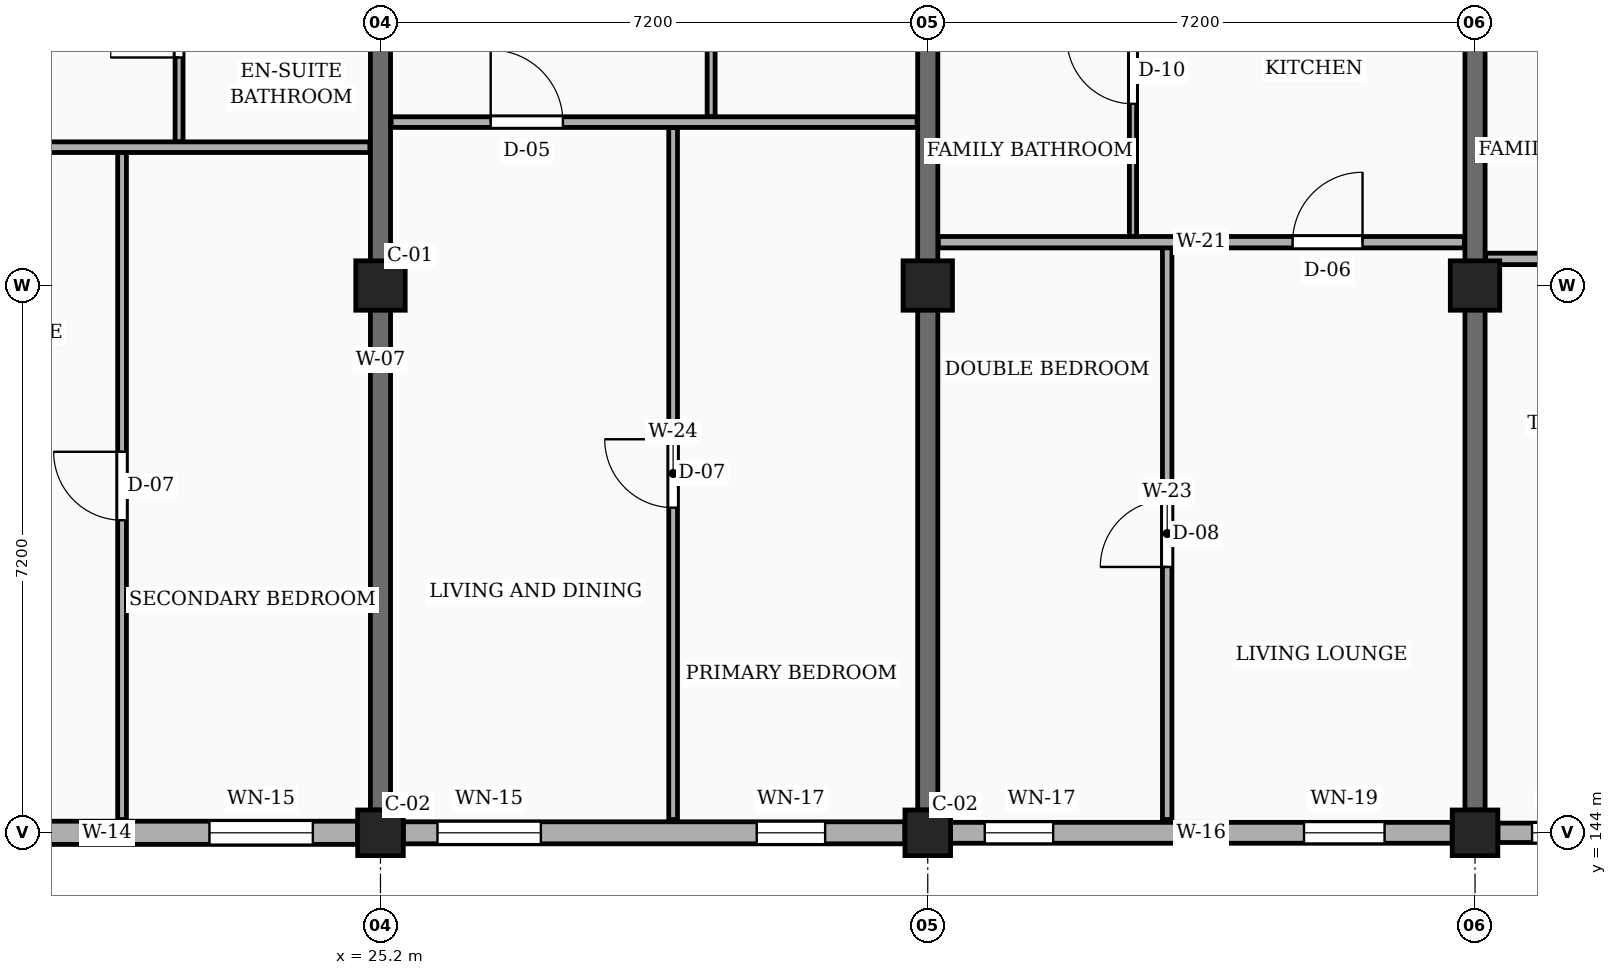
"""IFC4 building model, lengths in metres.
Left out: names, types, materials, properties, quantities, classifications, styles, units other than length and angle.
Written with IfcOpenShell. Run it as: python <this file> out.ifc"""

import sys

from ifc_helpers import new_model, si_unit, direction, frame, frame_2d, origin, origin_2d, place, context, subcontext, project, spatial, rectangle, extrude, element, fill, save


model = new_model("IFC4")
c1 = context("Model", 3, precision=1e-05, world=origin(), true_north=direction((0.0, 1.0)))
c2 = subcontext(c1, "Body", "Model", "MODEL_VIEW")
j1 = project(units=[si_unit("LENGTHUNIT", "METRE"), si_unit("PLANEANGLEUNIT", "RADIAN")], contexts=[c1])
p1 = place(None, origin())
s1 = spatial("IfcSite", under=j1, at=p1, CompositionType="ELEMENT")
p2 = place(p1, origin())
s2 = spatial("IfcBuilding", under=s1, at=p2, CompositionType="ELEMENT")
p3 = place(p2, frame((0.0, 0.0, 4.5)))
s3 = spatial("IfcBuildingStorey", under=s2, at=p3, CompositionType="ELEMENT", Elevation=4.5)
p4 = place(p3, frame((25.2, 144.0, 0.0), z_axis=(0.0, 0.0, 1.0), x_axis=(1.0, 0.0, 0.0)))
e1 = element("IfcColumn", 1, at=p4, inside=s3, PredefinedType="COLUMN", context=c2, shape_type="SweptSolid", body=[
    extrude(rectangle(XDim=0.6, YDim=0.6, at=origin_2d()), origin(), (0.0, 0.0, 1.0), 3.15),
])
p5 = place(p3, frame((25.2, 151.2, 0.0), z_axis=(0.0, 0.0, 1.0), x_axis=(1.0, 0.0, 0.0)))
e2 = element("IfcColumn", 2, at=p5, inside=s3, PredefinedType="COLUMN", context=c2, shape_type="SweptSolid", body=[
    extrude(rectangle(XDim=0.65, YDim=0.65, at=origin_2d()), origin(), (0.0, 0.0, 1.0), 3.15),
])
p6 = place(p3, frame((32.4, 144.0, 0.0), z_axis=(0.0, 0.0, 1.0), x_axis=(1.0, 0.0, 0.0)))
e3 = element("IfcColumn", 3, at=p6, inside=s3, PredefinedType="COLUMN", context=c2, shape_type="SweptSolid", body=[
    extrude(rectangle(XDim=0.6, YDim=0.6, at=origin_2d()), origin(), (0.0, 0.0, 1.0), 3.15),
])
p7 = place(p3, frame((32.4, 151.2, 0.0), z_axis=(0.0, 0.0, 1.0), x_axis=(1.0, 0.0, 0.0)))
e4 = element("IfcColumn", 4, at=p7, inside=s3, PredefinedType="COLUMN", context=c2, shape_type="SweptSolid", body=[
    extrude(rectangle(XDim=0.65, YDim=0.65, at=origin_2d()), origin(), (0.0, 0.0, 1.0), 3.15),
])
p8 = place(p3, frame((39.6, 144.0, 0.0), z_axis=(0.0, 0.0, 1.0), x_axis=(1.0, 0.0, 0.0)))
e5 = element("IfcColumn", 5, at=p8, inside=s3, PredefinedType="COLUMN", context=c2, shape_type="SweptSolid", body=[
    extrude(rectangle(XDim=0.6, YDim=0.6, at=origin_2d()), origin(), (0.0, 0.0, 1.0), 3.15),
])
p9 = place(p3, frame((39.6, 151.2, 0.0), z_axis=(0.0, 0.0, 1.0), x_axis=(1.0, 0.0, 0.0)))
e6 = element("IfcColumn", 6, at=p9, inside=s3, PredefinedType="COLUMN", context=c2, shape_type="SweptSolid", body=[
    extrude(rectangle(XDim=0.65, YDim=0.65, at=origin_2d()), origin(), (0.0, 0.0, 1.0), 3.15),
])
for number, where, z_axis, x_axis in (
    (7, (25.2, 144.3, 0.0), (0.0, 0.0, 1.0), (0.0, 1.0, 0.0)),
    (8, (32.4, 144.3, 0.0), (0.0, 0.0, 1.0), (0.0, 1.0, 0.0)),
    (9, (39.6, 144.3, 0.0), (0.0, 0.0, 1.0), (0.0, 1.0, 0.0)),
):
    element("IfcWall", number, at=place(p3, frame(where, z_axis=z_axis, x_axis=x_axis)), inside=s3, PredefinedType="SOLIDWALL", context=c2, shape_type="SweptSolid", body=[
        extrude(rectangle(XDim=11.85, YDim=0.265, at=frame_2d((5.925, 0.0))), origin(), (0.0, 0.0, 1.0), 2.185),
    ])
p10 = place(p3, frame((18.3, 144.0, 0.0), z_axis=(0.0, 0.0, 1.0), x_axis=(1.0, 0.0, 0.0)))
e10 = element("IfcWall", 10, at=p10, inside=s3, PredefinedType="SOLIDWALL", context=c2, shape_type="SweptSolid", body=[
    extrude(rectangle(XDim=6.6, YDim=0.305, at=frame_2d((3.3, 0.0))), origin(), (0.0, 0.0, 1.0), 2.455),
])
p11 = place(p10, frame((0.45, 0.0, 0.78)))
e11 = element("IfcOpeningElement", 11, at=p11, cuts=e10, PredefinedType="OPENING", context=c2, shape_type="SweptSolid", body=[
    extrude(rectangle(XDim=1.2, YDim=1.26, at=frame_2d((0.6, 0.63))), frame((0.0, 0.163, 0.0), z_axis=(0.0, -1.0, 0.0), x_axis=(1.0, 0.0, 0.0)), (0.0, 0.0, 1.0), 0.325),
])
p12 = place(p10, frame((4.65, 0.0, 0.78)))
e12 = element("IfcOpeningElement", 12, at=p12, cuts=e10, PredefinedType="OPENING", context=c2, shape_type="SweptSolid", body=[
    extrude(rectangle(XDim=1.36, YDim=1.26, at=frame_2d((0.68, 0.63))), frame((0.0, 0.163, 0.0), z_axis=(0.0, -1.0, 0.0), x_axis=(1.0, 0.0, 0.0)), (0.0, 0.0, 1.0), 0.325),
])
p13 = place(p3, frame((25.5, 144.0, 0.0), z_axis=(0.0, 0.0, 1.0), x_axis=(1.0, 0.0, 0.0)))
e13 = element("IfcWall", 13, at=p13, inside=s3, PredefinedType="SOLIDWALL", context=c2, shape_type="SweptSolid", body=[
    extrude(rectangle(XDim=6.6, YDim=0.29, at=frame_2d((3.3, 0.0))), origin(), (0.0, 0.0, 1.0), 2.455),
])
p14 = place(p13, frame((0.45, 0.0, 0.78)))
e14 = element("IfcOpeningElement", 14, at=p14, cuts=e13, PredefinedType="OPENING", context=c2, shape_type="SweptSolid", body=[
    extrude(rectangle(XDim=1.36, YDim=1.26, at=frame_2d((0.68, 0.63))), frame((0.0, 0.155, 0.0), z_axis=(0.0, -1.0, 0.0), x_axis=(1.0, 0.0, 0.0)), (0.0, 0.0, 1.0), 0.31),
])
p15 = place(p13, frame((4.65, 0.0, 0.78)))
e15 = element("IfcOpeningElement", 15, at=p15, cuts=e13, PredefinedType="OPENING", context=c2, shape_type="SweptSolid", body=[
    extrude(rectangle(XDim=0.9, YDim=1.36, at=frame_2d((0.45, 0.68))), frame((0.0, 0.155, 0.0), z_axis=(0.0, -1.0, 0.0), x_axis=(1.0, 0.0, 0.0)), (0.0, 0.0, 1.0), 0.31),
])
p16 = place(p3, frame((32.7, 144.0, 0.0), z_axis=(0.0, 0.0, 1.0), x_axis=(1.0, 0.0, 0.0)))
e16 = element("IfcWall", 16, at=p16, inside=s3, PredefinedType="SOLIDWALL", context=c2, shape_type="SweptSolid", body=[
    extrude(rectangle(XDim=6.6, YDim=0.275, at=frame_2d((3.3, 0.0))), origin(), (0.0, 0.0, 1.0), 2.455),
])
p17 = place(p16, frame((0.45, 0.0, 0.78)))
e17 = element("IfcOpeningElement", 17, at=p17, cuts=e16, PredefinedType="OPENING", context=c2, shape_type="SweptSolid", body=[
    extrude(rectangle(XDim=0.9, YDim=1.36, at=frame_2d((0.45, 0.68))), frame((0.0, 0.147, 0.0), z_axis=(0.0, -1.0, 0.0), x_axis=(1.0, 0.0, 0.0)), (0.0, 0.0, 1.0), 0.295),
])
p18 = place(p16, frame((4.65, 0.0, 0.78)))
e18 = element("IfcOpeningElement", 18, at=p18, cuts=e16, PredefinedType="OPENING", context=c2, shape_type="SweptSolid", body=[
    extrude(rectangle(XDim=1.06, YDim=1.36, at=frame_2d((0.53, 0.68))), frame((0.0, 0.147, 0.0), z_axis=(0.0, -1.0, 0.0), x_axis=(1.0, 0.0, 0.0)), (0.0, 0.0, 1.0), 0.295),
])
p19 = place(p3, frame((39.9, 144.0, 0.0), z_axis=(0.0, 0.0, 1.0), x_axis=(1.0, 0.0, 0.0)))
e19 = element("IfcWall", 19, at=p19, inside=s3, PredefinedType="SOLIDWALL", context=c2, shape_type="SweptSolid", body=[
    extrude(rectangle(XDim=6.6, YDim=0.255, at=frame_2d((3.3, 0.0))), origin(), (0.0, 0.0, 1.0), 2.455),
])
p20 = place(p19, frame((0.45, 0.0, 0.78)))
e20 = element("IfcOpeningElement", 20, at=p20, cuts=e19, PredefinedType="OPENING", context=c2, shape_type="SweptSolid", body=[
    extrude(rectangle(XDim=1.06, YDim=1.36, at=frame_2d((0.53, 0.68))), frame((0.0, 0.137, 0.0), z_axis=(0.0, -1.0, 0.0), x_axis=(1.0, 0.0, 0.0)), (0.0, 0.0, 1.0), 0.275),
])
p21 = place(p19, frame((4.65, 0.0, 0.78)))
e21 = element("IfcOpeningElement", 21, at=p21, cuts=e19, PredefinedType="OPENING", context=c2, shape_type="SweptSolid", body=[
    extrude(rectangle(XDim=1.22, YDim=1.36, at=frame_2d((0.61, 0.68))), frame((0.0, 0.137, 0.0), z_axis=(0.0, -1.0, 0.0), x_axis=(1.0, 0.0, 0.0)), (0.0, 0.0, 1.0), 0.275),
])
p22 = place(p3, frame((21.8, 144.175, 0.0), z_axis=(0.0, 0.0, 1.0), x_axis=(0.0, 1.0, 0.0)))
e22 = element("IfcWall", 22, at=p22, inside=s3, PredefinedType="PARTITIONING", context=c2, shape_type="SweptSolid", body=[
    extrude(rectangle(XDim=8.775, YDim=0.115, at=frame_2d((4.387, 0.0))), origin(), (0.0, 0.0, 1.0), 2.32),
])
p23 = place(p22, frame((3.938, 0.0, 0.0)))
e23 = element("IfcOpeningElement", 23, at=p23, cuts=e22, PredefinedType="OPENING", context=c2, shape_type="SweptSolid", body=[
    extrude(rectangle(XDim=0.9, YDim=2.1, at=frame_2d((0.45, 1.05))), frame((0.0, 0.067, 0.0), z_axis=(0.0, -1.0, 0.0), x_axis=(1.0, 0.0, 0.0)), (0.0, 0.0, 1.0), 0.135),
])
p24 = place(p3, frame((22.55, 153.09, 0.0), z_axis=(0.0, 0.0, 1.0), x_axis=(0.0, 1.0, 0.0)))
e24 = element("IfcWall", 24, at=p24, inside=s3, PredefinedType="PARTITIONING", context=c2, shape_type="SweptSolid", body=[
    extrude(rectangle(XDim=3.12, YDim=0.105, at=frame_2d((1.56, 0.0))), origin(), (0.0, 0.0, 1.0), 2.32),
])
p25 = place(p24, frame((1.11, 0.0, 0.0)))
e25 = element("IfcOpeningElement", 25, at=p25, cuts=e24, PredefinedType="OPENING", context=c2, shape_type="SweptSolid", body=[
    extrude(rectangle(XDim=0.9, YDim=2.05, at=frame_2d((0.45, 1.025))), frame((0.0, 0.062, 0.0), z_axis=(0.0, -1.0, 0.0), x_axis=(1.0, 0.0, 0.0)), (0.0, 0.0, 1.0), 0.125),
])
p26 = place(p3, frame((18.14, 153.02, 0.0), z_axis=(0.0, 0.0, 1.0), x_axis=(1.0, 0.0, 0.0)))
e26 = element("IfcWall", 26, at=p26, inside=s3, PredefinedType="PARTITIONING", context=c2, shape_type="SweptSolid", body=[
    extrude(rectangle(XDim=6.92, YDim=0.14, at=frame_2d((3.46, 0.0))), origin(), (0.0, 0.0, 1.0), 2.32),
])
p27 = place(p26, frame((1.31, 0.0, 0.0)))
e27 = element("IfcOpeningElement", 27, at=p27, cuts=e26, PredefinedType="OPENING", context=c2, shape_type="SweptSolid", body=[
    extrude(rectangle(XDim=0.95, YDim=2.1, at=frame_2d((0.475, 1.05))), frame((0.0, 0.08, 0.0), z_axis=(0.0, -1.0, 0.0), x_axis=(1.0, 0.0, 0.0)), (0.0, 0.0, 1.0), 0.16),
])
p28 = place(p3, frame((29.05, 144.175, 0.0), z_axis=(0.0, 0.0, 1.0), x_axis=(0.0, 1.0, 0.0)))
e28 = element("IfcWall", 28, at=p28, inside=s3, PredefinedType="PARTITIONING", context=c2, shape_type="SweptSolid", body=[
    extrude(rectangle(XDim=9.105, YDim=0.115, at=frame_2d((4.552, 0.0))), origin(), (0.0, 0.0, 1.0), 2.32),
])
p29 = place(p28, frame((4.103, 0.0, 0.0)))
e29 = element("IfcOpeningElement", 29, at=p29, cuts=e28, PredefinedType="OPENING", context=c2, shape_type="SweptSolid", body=[
    extrude(rectangle(XDim=0.9, YDim=2.1, at=frame_2d((0.45, 1.05))), frame((0.0, 0.067, 0.0), z_axis=(0.0, -1.0, 0.0), x_axis=(1.0, 0.0, 0.0)), (0.0, 0.0, 1.0), 0.135),
])
p30 = place(p3, frame((29.55, 153.42, 0.0), z_axis=(0.0, 0.0, 1.0), x_axis=(0.0, 1.0, 0.0)))
e30 = element("IfcWall", 30, at=p30, inside=s3, PredefinedType="PARTITIONING", context=c2, shape_type="SweptSolid", body=[
    extrude(rectangle(XDim=2.79, YDim=0.105, at=frame_2d((1.395, 0.0))), origin(), (0.0, 0.0, 1.0), 2.32),
])
p31 = place(p30, frame((0.945, 0.0, 0.0)))
e31 = element("IfcOpeningElement", 31, at=p31, cuts=e30, PredefinedType="OPENING", context=c2, shape_type="SweptSolid", body=[
    extrude(rectangle(XDim=0.9, YDim=2.05, at=frame_2d((0.45, 1.025))), frame((0.0, 0.062, 0.0), z_axis=(0.0, -1.0, 0.0), x_axis=(1.0, 0.0, 0.0)), (0.0, 0.0, 1.0), 0.125),
])
p32 = place(p3, frame((25.34, 153.35, 0.0), z_axis=(0.0, 0.0, 1.0), x_axis=(1.0, 0.0, 0.0)))
e32 = element("IfcWall", 32, at=p32, inside=s3, PredefinedType="PARTITIONING", context=c2, shape_type="SweptSolid", body=[
    extrude(rectangle(XDim=6.92, YDim=0.14, at=frame_2d((3.46, 0.0))), origin(), (0.0, 0.0, 1.0), 2.32),
])
p33 = place(p32, frame((1.31, 0.0, 0.0)))
e33 = element("IfcOpeningElement", 33, at=p33, cuts=e32, PredefinedType="OPENING", context=c2, shape_type="SweptSolid", body=[
    extrude(rectangle(XDim=0.95, YDim=2.1, at=frame_2d((0.475, 1.05))), frame((0.0, 0.08, 0.0), z_axis=(0.0, -1.0, 0.0), x_axis=(1.0, 0.0, 0.0)), (0.0, 0.0, 1.0), 0.16),
])
p34 = place(p3, frame((35.55, 144.175, 0.0), z_axis=(0.0, 0.0, 1.0), x_axis=(0.0, 1.0, 0.0)))
e34 = element("IfcWall", 34, at=p34, inside=s3, PredefinedType="PARTITIONING", context=c2, shape_type="SweptSolid", body=[
    extrude(rectangle(XDim=7.525, YDim=0.125, at=frame_2d((3.762, 0.0))), origin(), (0.0, 0.0, 1.0), 2.32),
])
p35 = place(p34, frame((3.323, 0.0, 0.0)))
e35 = element("IfcOpeningElement", 35, at=p35, cuts=e34, PredefinedType="OPENING", context=c2, shape_type="SweptSolid", body=[
    extrude(rectangle(XDim=0.88, YDim=2.08, at=frame_2d((0.44, 1.04))), frame((0.0, 0.073, 0.0), z_axis=(0.0, -1.0, 0.0), x_axis=(1.0, 0.0, 0.0)), (0.0, 0.0, 1.0), 0.145),
])
p36 = place(p3, frame((35.1, 151.84, 0.0), z_axis=(0.0, 0.0, 1.0), x_axis=(0.0, 1.0, 0.0)))
e36 = element("IfcWall", 36, at=p36, inside=s3, PredefinedType="PARTITIONING", context=c2, shape_type="SweptSolid", body=[
    extrude(rectangle(XDim=4.37, YDim=0.095, at=frame_2d((2.185, 0.0))), origin(), (0.0, 0.0, 1.0), 2.32),
])
p37 = place(p36, frame((1.75, 0.0, 0.0)))
e37 = element("IfcOpeningElement", 37, at=p37, cuts=e36, PredefinedType="OPENING", context=c2, shape_type="SweptSolid", body=[
    extrude(rectangle(XDim=0.87, YDim=2.05, at=frame_2d((0.435, 1.025))), frame((0.0, 0.058, 0.0), z_axis=(0.0, -1.0, 0.0), x_axis=(1.0, 0.0, 0.0)), (0.0, 0.0, 1.0), 0.115),
])
p38 = place(p3, frame((32.54, 151.77, 0.0), z_axis=(0.0, 0.0, 1.0), x_axis=(1.0, 0.0, 0.0)))
e38 = element("IfcWall", 38, at=p38, inside=s3, PredefinedType="PARTITIONING", context=c2, shape_type="SweptSolid", body=[
    extrude(rectangle(XDim=6.92, YDim=0.15, at=frame_2d((3.46, 0.0))), origin(), (0.0, 0.0, 1.0), 2.32),
])
p39 = place(p38, frame((4.66, 0.0, 0.0)))
e39 = element("IfcOpeningElement", 39, at=p39, cuts=e38, PredefinedType="OPENING", context=c2, shape_type="SweptSolid", body=[
    extrude(rectangle(XDim=0.92, YDim=2.1, at=frame_2d((0.46, 1.05))), frame((0.0, 0.085, 0.0), z_axis=(0.0, -1.0, 0.0), x_axis=(1.0, 0.0, 0.0)), (0.0, 0.0, 1.0), 0.17),
])
p40 = place(p3, frame((39.74, 151.55, 0.0), z_axis=(0.0, 0.0, 1.0), x_axis=(1.0, 0.0, 0.0)))
e40 = element("IfcWall", 40, at=p40, inside=s3, PredefinedType="PARTITIONING", context=c2, shape_type="SweptSolid", body=[
    extrude(rectangle(XDim=6.92, YDim=0.15, at=frame_2d((3.46, 0.0))), origin(), (0.0, 0.0, 1.0), 2.32),
])
p41 = place(p40, frame((4.66, 0.0, 0.0)))
e41 = element("IfcOpeningElement", 41, at=p41, cuts=e40, PredefinedType="OPENING", context=c2, shape_type="SweptSolid", body=[
    extrude(rectangle(XDim=0.95, YDim=2.1, at=frame_2d((0.475, 1.05))), frame((0.0, 0.085, 0.0), z_axis=(0.0, -1.0, 0.0), x_axis=(1.0, 0.0, 0.0)), (0.0, 0.0, 1.0), 0.17),
])
p42 = place(p12, origin())
e42 = element("IfcWindow", 42, at=p42, inside=s3, PartitioningType="SINGLE_PANEL", PredefinedType="WINDOW", context=c2, shape_type="SweptSolid", body=[
    extrude(rectangle(XDim=1.36, YDim=1.26, at=frame_2d((0.68, 0.63))), frame((0.0, 0.03, 0.0), z_axis=(0.0, -1.0, 0.0), x_axis=(1.0, 0.0, 0.0)), (0.0, 0.0, 1.0), 0.06),
])
fill(e12, e42)
p43 = place(p14, origin())
e43 = element("IfcWindow", 43, at=p43, inside=s3, PartitioningType="SINGLE_PANEL", PredefinedType="WINDOW", context=c2, shape_type="SweptSolid", body=[
    extrude(rectangle(XDim=1.36, YDim=1.26, at=frame_2d((0.68, 0.63))), frame((0.0, 0.03, 0.0), z_axis=(0.0, -1.0, 0.0), x_axis=(1.0, 0.0, 0.0)), (0.0, 0.0, 1.0), 0.06),
])
fill(e14, e43)
p44 = place(p15, origin())
e44 = element("IfcWindow", 44, at=p44, inside=s3, PartitioningType="SINGLE_PANEL", PredefinedType="WINDOW", context=c2, shape_type="SweptSolid", body=[
    extrude(rectangle(XDim=0.9, YDim=1.36, at=frame_2d((0.45, 0.68))), frame((0.0, 0.03, 0.0), z_axis=(0.0, -1.0, 0.0), x_axis=(1.0, 0.0, 0.0)), (0.0, 0.0, 1.0), 0.06),
])
fill(e15, e44)
p45 = place(p17, origin())
e45 = element("IfcWindow", 45, at=p45, inside=s3, PartitioningType="SINGLE_PANEL", PredefinedType="WINDOW", context=c2, shape_type="SweptSolid", body=[
    extrude(rectangle(XDim=0.9, YDim=1.36, at=frame_2d((0.45, 0.68))), frame((0.0, 0.03, 0.0), z_axis=(0.0, -1.0, 0.0), x_axis=(1.0, 0.0, 0.0)), (0.0, 0.0, 1.0), 0.06),
])
fill(e17, e45)
p46 = place(p18, origin())
e46 = element("IfcWindow", 46, at=p46, inside=s3, PartitioningType="SINGLE_PANEL", PredefinedType="WINDOW", context=c2, shape_type="SweptSolid", body=[
    extrude(rectangle(XDim=1.06, YDim=1.36, at=frame_2d((0.53, 0.68))), frame((0.0, 0.03, 0.0), z_axis=(0.0, -1.0, 0.0), x_axis=(1.0, 0.0, 0.0)), (0.0, 0.0, 1.0), 0.06),
])
fill(e18, e46)
p47 = place(p20, origin())
e47 = element("IfcWindow", 47, at=p47, inside=s3, PartitioningType="SINGLE_PANEL", PredefinedType="WINDOW", context=c2, shape_type="SweptSolid", body=[
    extrude(rectangle(XDim=1.06, YDim=1.36, at=frame_2d((0.53, 0.68))), frame((0.0, 0.03, 0.0), z_axis=(0.0, -1.0, 0.0), x_axis=(1.0, 0.0, 0.0)), (0.0, 0.0, 1.0), 0.06),
])
fill(e20, e47)
p48 = place(p23, origin())
e48 = element("IfcDoor", 48, at=p48, inside=s3, OperationType="SINGLE_SWING_RIGHT", PredefinedType="DOOR", context=c2, shape_type="SweptSolid", body=[
    extrude(rectangle(XDim=0.9, YDim=2.1, at=frame_2d((0.45, 1.05))), frame((0.0, 0.025, 0.0), z_axis=(0.0, -1.0, 0.0), x_axis=(1.0, 0.0, 0.0)), (0.0, 0.0, 1.0), 0.05),
])
fill(e23, e48)
p49 = place(p25, origin())
e49 = element("IfcDoor", 49, at=p49, inside=s3, OperationType="SINGLE_SWING_LEFT", PredefinedType="DOOR", context=c2, shape_type="SweptSolid", body=[
    extrude(rectangle(XDim=0.9, YDim=2.05, at=frame_2d((0.45, 1.025))), frame((0.0, 0.025, 0.0), z_axis=(0.0, -1.0, 0.0), x_axis=(1.0, 0.0, 0.0)), (0.0, 0.0, 1.0), 0.05),
])
fill(e25, e49)
p50 = place(p29, origin())
e50 = element("IfcDoor", 50, at=p50, inside=s3, OperationType="SINGLE_SWING_RIGHT", PredefinedType="DOOR", context=c2, shape_type="SweptSolid", body=[
    extrude(rectangle(XDim=0.9, YDim=2.1, at=frame_2d((0.45, 1.05))), frame((0.0, 0.025, 0.0), z_axis=(0.0, -1.0, 0.0), x_axis=(1.0, 0.0, 0.0)), (0.0, 0.0, 1.0), 0.05),
])
fill(e29, e50)
p51 = place(p33, origin())
e51 = element("IfcDoor", 51, at=p51, inside=s3, OperationType="SINGLE_SWING_LEFT", PredefinedType="DOOR", context=c2, shape_type="SweptSolid", body=[
    extrude(rectangle(XDim=0.95, YDim=2.1, at=frame_2d((0.475, 1.05))), frame((0.0, 0.025, 0.0), z_axis=(0.0, -1.0, 0.0), x_axis=(1.0, 0.0, 0.0)), (0.0, 0.0, 1.0), 0.05),
])
fill(e33, e51)
p52 = place(p35, origin())
e52 = element("IfcDoor", 52, at=p52, inside=s3, OperationType="SINGLE_SWING_LEFT", PredefinedType="DOOR", context=c2, shape_type="SweptSolid", body=[
    extrude(rectangle(XDim=0.88, YDim=2.08, at=frame_2d((0.44, 1.04))), frame((0.0, 0.025, 0.0), z_axis=(0.0, -1.0, 0.0), x_axis=(1.0, 0.0, 0.0)), (0.0, 0.0, 1.0), 0.05),
])
fill(e35, e52)
p53 = place(p37, origin())
e53 = element("IfcDoor", 53, at=p53, inside=s3, OperationType="SINGLE_SWING_RIGHT", PredefinedType="DOOR", context=c2, shape_type="SweptSolid", body=[
    extrude(rectangle(XDim=0.87, YDim=2.05, at=frame_2d((0.435, 1.025))), frame((0.0, 0.025, 0.0), z_axis=(0.0, -1.0, 0.0), x_axis=(1.0, 0.0, 0.0)), (0.0, 0.0, 1.0), 0.05),
])
fill(e37, e53)
p54 = place(p39, origin())
e54 = element("IfcDoor", 54, at=p54, inside=s3, OperationType="SINGLE_SWING_RIGHT", PredefinedType="DOOR", context=c2, shape_type="SweptSolid", body=[
    extrude(rectangle(XDim=0.92, YDim=2.1, at=frame_2d((0.46, 1.05))), frame((0.0, 0.025, 0.0), z_axis=(0.0, -1.0, 0.0), x_axis=(1.0, 0.0, 0.0)), (0.0, 0.0, 1.0), 0.05),
])
fill(e39, e54)
save(model, sys.argv[1])
